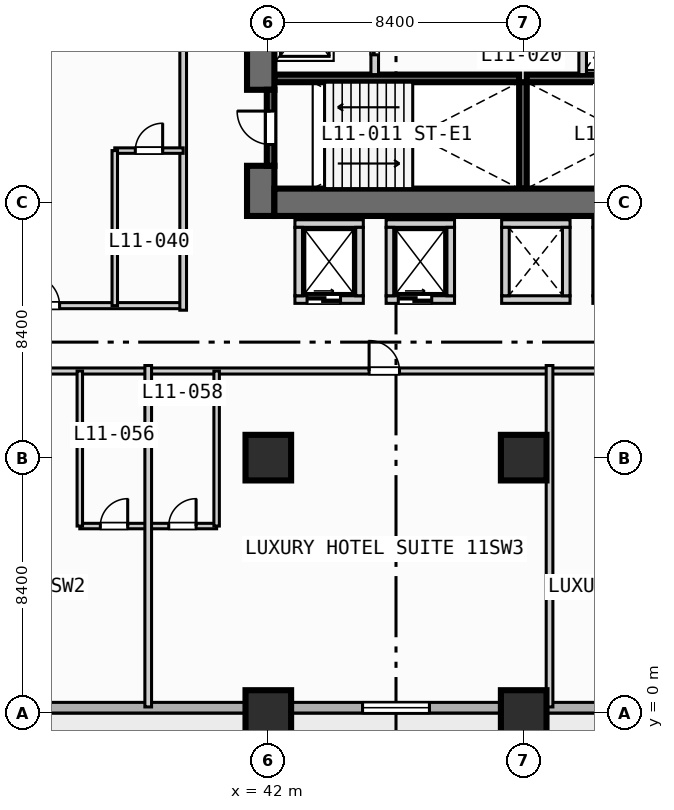
"""IFC4 building model, lengths in metres.
Left out: names, types, materials, properties, quantities, classifications, styles, units other than length and angle.
Written with IfcOpenShell. Run it as: python <this file> out.ifc"""

import sys

from ifc_helpers import new_model, si_unit, direction, frame, frame_2d, origin, origin_2d, place, context, subcontext, project, spatial, rectangle, extrude, element, fill, save


model = new_model("IFC4")
c1 = context("Model", 3, precision=1e-05, world=origin(), true_north=direction((0.0, 1.0)))
c2 = subcontext(c1, "Body", "Model", "MODEL_VIEW")
j1 = project(units=[si_unit("LENGTHUNIT", "METRE"), si_unit("PLANEANGLEUNIT", "RADIAN")], contexts=[c1])
p1 = place(None, origin())
s1 = spatial("IfcSite", under=j1, at=p1, CompositionType="ELEMENT")
p2 = place(p1, origin())
s2 = spatial("IfcBuilding", under=s1, at=p2, CompositionType="ELEMENT")
p3 = place(p2, frame((0.0, 0.0, 51.0)))
s3 = spatial("IfcBuildingStorey", under=s2, at=p3, CompositionType="ELEMENT", Elevation=51.0)
for number, where, z_axis, x_axis in (
    (1, (42.2, 20.875, 0.0), (0.0, 0.0, 1.0), (1.0, 0.0, 0.0)),
    (2, (50.5, 20.875, 0.0), (0.0, 0.0, 1.0), (1.0, 0.0, 0.0)),
):
    element("IfcWall", number, at=place(p3, frame(where, z_axis=z_axis, x_axis=x_axis)), inside=s3, PredefinedType="SOLIDWALL", context=c2, shape_type="SweptSolid", body=[
        extrude(rectangle(XDim=8.05, YDim=0.25, at=frame_2d((4.025, 0.0))), origin(), (0.0, 0.0, 1.0), 3.55),
    ])
p4 = place(p3, frame((50.375, 17.25, 0.0), z_axis=(0.0, 0.0, 1.0), x_axis=(0.0, 1.0, 0.0)))
e3 = element("IfcWall", 3, at=p4, inside=s3, PredefinedType="SOLIDWALL", context=c2, shape_type="SweptSolid", body=[
    extrude(rectangle(XDim=3.5, YDim=0.25, at=frame_2d((1.75, 0.0))), origin(), (0.0, 0.0, 1.0), 3.55),
])
p5 = place(p3, frame((41.75, 16.35, 0.0), z_axis=(0.0, 0.0, 1.0), x_axis=(0.0, 1.0, 0.0)))
e4 = element("IfcWall", 4, at=p5, inside=s3, PredefinedType="SHEAR", context=c2, shape_type="SweptSolid", body=[
    extrude(rectangle(XDim=1.65, YDim=0.9, at=frame_2d((0.825, 0.0))), origin(), (0.0, 0.0, 1.0), 3.55),
])
p6 = place(p3, frame((41.75, 20.5, 0.0), z_axis=(0.0, 0.0, 1.0), x_axis=(0.0, 1.0, 0.0)))
e5 = element("IfcWall", 5, at=p6, inside=s3, PredefinedType="SHEAR", context=c2, shape_type="SweptSolid", body=[
    extrude(rectangle(XDim=5.15, YDim=0.9, at=frame_2d((2.575, 0.0))), origin(), (0.0, 0.0, 1.0), 3.55),
])
p7 = place(p3, frame((42.2, 16.8, 0.0), z_axis=(0.0, 0.0, 1.0), x_axis=(1.0, 0.0, 0.0)))
e6 = element("IfcWall", 6, at=p7, inside=s3, PredefinedType="SHEAR", context=c2, shape_type="SweptSolid", body=[
    extrude(rectangle(XDim=16.35, YDim=0.9, at=frame_2d((8.175, 0.0))), origin(), (0.0, 0.0, 1.0), 3.55),
])
for number, where, z_axis, x_axis in (
    (7, (42.0, 0.0, 0.0), (0.0, 0.0, 1.0), (1.0, 0.0, 0.0)),
    (8, (42.0, 8.4, 0.0), (0.0, 0.0, 1.0), (1.0, 0.0, 0.0)),
    (9, (50.4, 0.0, 0.0), (0.0, 0.0, 1.0), (1.0, 0.0, 0.0)),
    (10, (50.4, 8.4, 0.0), (0.0, 0.0, 1.0), (1.0, 0.0, 0.0)),
):
    element("IfcColumn", number, at=place(p3, frame(where, z_axis=z_axis, x_axis=x_axis)), inside=s3, PredefinedType="COLUMN", context=c2, shape_type="SweptSolid", body=[
        extrude(rectangle(XDim=1.5, YDim=1.5, at=origin_2d()), origin(), (0.0, 0.0, 1.0), 3.8),
    ])
p8 = place(p3, frame((89.225, 0.175, 0.0), z_axis=(0.0, 0.0, 1.0), x_axis=(-1.0, 0.0, 0.0)))
e11 = element("IfcWall", 11, at=p8, inside=s3, PredefinedType="STANDARD", context=c2, shape_type="SweptSolid", body=[
    extrude(rectangle(XDim=86.05, YDim=0.35, at=frame_2d((43.025, 0.0))), origin(), (0.0, 0.0, 1.0), 3.55),
])
p9 = place(p8, frame((67.525, 0.0, 0.0)))
e12 = element("IfcOpeningElement", 12, at=p9, cuts=e11, PredefinedType="OPENING", context=c2, shape_type="SweptSolid", body=[
    extrude(rectangle(XDim=1.4, YDim=2.2, at=frame_2d((0.7, 1.1))), frame((0.0, 0.185, 0.0), z_axis=(0.0, -1.0, 0.0), x_axis=(1.0, 0.0, 0.0)), (0.0, 0.0, 1.0), 0.37),
])
p10 = place(p8, frame((58.725, 0.0, 0.85)))
e13 = element("IfcOpeningElement", 13, at=p10, cuts=e11, PredefinedType="OPENING", context=c2, shape_type="SweptSolid", body=[
    extrude(rectangle(XDim=2.2, YDim=1.8, at=frame_2d((1.1, 0.9))), frame((0.0, 0.185, 0.0), z_axis=(0.0, -1.0, 0.0), x_axis=(1.0, 0.0, 0.0)), (0.0, 0.0, 1.0), 0.37),
])
p11 = place(p8, frame((41.925, 0.0, 0.85)))
e14 = element("IfcOpeningElement", 14, at=p11, cuts=e11, PredefinedType="OPENING", context=c2, shape_type="SweptSolid", body=[
    extrude(rectangle(XDim=2.2, YDim=1.8, at=frame_2d((1.1, 0.9))), frame((0.0, 0.185, 0.0), z_axis=(0.0, -1.0, 0.0), x_axis=(1.0, 0.0, 0.0)), (0.0, 0.0, 1.0), 0.37),
])
p12 = place(p8, frame((33.525, 0.0, 0.85)))
e15 = element("IfcOpeningElement", 15, at=p12, cuts=e11, PredefinedType="OPENING", context=c2, shape_type="SweptSolid", body=[
    extrude(rectangle(XDim=2.2, YDim=1.8, at=frame_2d((1.1, 0.9))), frame((0.0, 0.185, 0.0), z_axis=(0.0, -1.0, 0.0), x_axis=(1.0, 0.0, 0.0)), (0.0, 0.0, 1.0), 0.37),
])
p13 = place(p8, frame((16.725, 0.0, 0.85)))
e16 = element("IfcOpeningElement", 16, at=p13, cuts=e11, PredefinedType="OPENING", context=c2, shape_type="SweptSolid", body=[
    extrude(rectangle(XDim=2.2, YDim=1.8, at=frame_2d((1.1, 0.9))), frame((0.0, 0.185, 0.0), z_axis=(0.0, -1.0, 0.0), x_axis=(1.0, 0.0, 0.0)), (0.0, 0.0, 1.0), 0.37),
])
p14 = place(p8, frame((8.325, 0.0, 0.85)))
e17 = element("IfcOpeningElement", 17, at=p14, cuts=e11, PredefinedType="OPENING", context=c2, shape_type="SweptSolid", body=[
    extrude(rectangle(XDim=2.2, YDim=1.8, at=frame_2d((1.1, 0.9))), frame((0.0, 0.185, 0.0), z_axis=(0.0, -1.0, 0.0), x_axis=(1.0, 0.0, 0.0)), (0.0, 0.0, 1.0), 0.37),
])
p15 = place(p3, frame((42.075, 18.0, 0.0), z_axis=(0.0, 0.0, 1.0), x_axis=(0.0, 1.0, 0.0)))
e18 = element("IfcWall", 18, at=p15, inside=s3, PredefinedType="SOLIDWALL", context=c2, shape_type="SweptSolid", body=[
    extrude(rectangle(XDim=2.5, YDim=0.25, at=frame_2d((1.25, 0.0))), origin(), (0.0, 0.0, 1.0), 3.55),
])
p16 = place(p15, frame((0.7, 0.0, 0.0)))
e19 = element("IfcOpeningElement", 19, at=p16, cuts=e18, PredefinedType="OPENING", context=c2, shape_type="SweptSolid", body=[
    extrude(rectangle(XDim=1.1, YDim=2.15, at=frame_2d((0.55, 1.075))), frame((0.0, 0.135, 0.0), z_axis=(0.0, -1.0, 0.0), x_axis=(1.0, 0.0, 0.0)), (0.0, 0.0, 1.0), 0.27),
])
p17 = place(p3, frame((45.5, 21.0, 0.0), z_axis=(0.0, 0.0, 1.0), x_axis=(0.0, 1.0, 0.0)))
e20 = element("IfcWall", 20, at=p17, inside=s3, PredefinedType="SOLIDWALL", context=c2, shape_type="SweptSolid", body=[
    extrude(rectangle(XDim=4.15, YDim=0.25, at=frame_2d((2.075, 0.0))), origin(), (0.0, 0.0, 1.0), 3.55),
])
p18 = place(p17, frame((0.65, 0.0, 0.0)))
e21 = element("IfcOpeningElement", 21, at=p18, cuts=e20, PredefinedType="OPENING", context=c2, shape_type="SweptSolid", body=[
    extrude(rectangle(XDim=1.1, YDim=2.15, at=frame_2d((0.55, 1.075))), frame((0.0, 0.135, 0.0), z_axis=(0.0, -1.0, 0.0), x_axis=(1.0, 0.0, 0.0)), (0.0, 0.0, 1.0), 0.27),
])
p19 = place(p3, frame((52.34, 21.0, 0.0), z_axis=(0.0, 0.0, 1.0), x_axis=(0.0, 1.0, 0.0)))
e22 = element("IfcWall", 22, at=p19, inside=s3, PredefinedType="SOLIDWALL", context=c2, shape_type="SweptSolid", body=[
    extrude(rectangle(XDim=3.75, YDim=0.25, at=frame_2d((1.875, 0.0))), origin(), (0.0, 0.0, 1.0), 3.55),
])
p20 = place(p3, frame((42.875, 13.6, 0.0), z_axis=(0.0, 0.0, 1.0), x_axis=(1.0, 0.0, 0.0)))
e23 = element("IfcWall", 23, at=p20, inside=s3, PredefinedType="SOLIDWALL", context=c2, shape_type="SweptSolid", body=[
    extrude(rectangle(XDim=2.25, YDim=0.25, at=frame_2d((1.125, 0.0))), origin(), (0.0, 0.0, 1.0), 3.55),
])
p21 = place(p20, frame((0.4, 0.0, 0.0)))
e24 = element("IfcOpeningElement", 24, at=p21, cuts=e23, PredefinedType="OPENING", context=c2, shape_type="SweptSolid", body=[
    extrude(rectangle(XDim=1.1, YDim=2.15, at=frame_2d((0.55, 1.075))), frame((0.0, 0.135, 0.0), z_axis=(0.0, -1.0, 0.0), x_axis=(1.0, 0.0, 0.0)), (0.0, 0.0, 1.0), 0.27),
])
for number, where, z_axis, x_axis in (
    (25, (42.875, 16.1, 0.0), (0.0, 0.0, 1.0), (1.0, 0.0, 0.0)),
    (26, (43.0, 13.725, 0.0), (0.0, 0.0, 1.0), (0.0, 1.0, 0.0)),
    (27, (45.0, 13.725, 0.0), (0.0, 0.0, 1.0), (0.0, 1.0, 0.0)),
):
    element("IfcWall", number, at=place(p3, frame(where, z_axis=z_axis, x_axis=x_axis)), inside=s3, PredefinedType="SOLIDWALL", context=c2, shape_type="SweptSolid", body=[
        extrude(rectangle(XDim=2.25, YDim=0.25, at=frame_2d((1.125, 0.0))), origin(), (0.0, 0.0, 1.0), 3.55),
    ])
p22 = place(p3, frame((45.875, 13.6, 0.0), z_axis=(0.0, 0.0, 1.0), x_axis=(1.0, 0.0, 0.0)))
e28 = element("IfcWall", 28, at=p22, inside=s3, PredefinedType="SOLIDWALL", context=c2, shape_type="SweptSolid", body=[
    extrude(rectangle(XDim=2.25, YDim=0.25, at=frame_2d((1.125, 0.0))), origin(), (0.0, 0.0, 1.0), 3.55),
])
p23 = place(p22, frame((0.4, 0.0, 0.0)))
e29 = element("IfcOpeningElement", 29, at=p23, cuts=e28, PredefinedType="OPENING", context=c2, shape_type="SweptSolid", body=[
    extrude(rectangle(XDim=1.1, YDim=2.15, at=frame_2d((0.55, 1.075))), frame((0.0, 0.135, 0.0), z_axis=(0.0, -1.0, 0.0), x_axis=(1.0, 0.0, 0.0)), (0.0, 0.0, 1.0), 0.27),
])
for number, where, z_axis, x_axis in (
    (30, (45.875, 16.1, 0.0), (0.0, 0.0, 1.0), (1.0, 0.0, 0.0)),
    (31, (46.0, 13.725, 0.0), (0.0, 0.0, 1.0), (0.0, 1.0, 0.0)),
    (32, (48.0, 13.725, 0.0), (0.0, 0.0, 1.0), (0.0, 1.0, 0.0)),
    (33, (49.675, 13.6, 0.0), (0.0, 0.0, 1.0), (1.0, 0.0, 0.0)),
    (34, (49.675, 16.1, 0.0), (0.0, 0.0, 1.0), (1.0, 0.0, 0.0)),
    (35, (49.8, 13.725, 0.0), (0.0, 0.0, 1.0), (0.0, 1.0, 0.0)),
    (36, (51.8, 13.725, 0.0), (0.0, 0.0, 1.0), (0.0, 1.0, 0.0)),
    (37, (52.675, 13.6, 0.0), (0.0, 0.0, 1.0), (1.0, 0.0, 0.0)),
    (38, (52.675, 16.1, 0.0), (0.0, 0.0, 1.0), (1.0, 0.0, 0.0)),
    (39, (52.8, 13.725, 0.0), (0.0, 0.0, 1.0), (0.0, 1.0, 0.0)),
):
    element("IfcWall", number, at=place(p3, frame(where, z_axis=z_axis, x_axis=x_axis)), inside=s3, PredefinedType="SOLIDWALL", context=c2, shape_type="SweptSolid", body=[
        extrude(rectangle(XDim=2.25, YDim=0.25, at=frame_2d((1.125, 0.0))), origin(), (0.0, 0.0, 1.0), 3.55),
    ])
p24 = place(p3, frame((25.6, 13.4, 0.0), z_axis=(0.0, 0.0, 1.0), x_axis=(1.0, 0.0, 0.0)))
e40 = element("IfcWall", 40, at=p24, inside=s3, PredefinedType="PARTITIONING", context=c2, shape_type="SweptSolid", body=[
    extrude(rectangle(XDim=13.6, YDim=0.2, at=frame_2d((6.8, 0.0))), origin(), (0.0, 0.0, 1.0), 3.55),
])
p25 = place(p24, frame((1.735, 0.0, 0.0)))
e41 = element("IfcOpeningElement", 41, at=p25, cuts=e40, PredefinedType="OPENING", context=c2, shape_type="SweptSolid", body=[
    extrude(rectangle(XDim=1.0, YDim=2.15, at=frame_2d((0.5, 1.075))), frame((0.0, 0.11, 0.0), z_axis=(0.0, -1.0, 0.0), x_axis=(1.0, 0.0, 0.0)), (0.0, 0.0, 1.0), 0.22),
])
p26 = place(p24, frame((8.535, 0.0, 0.0)))
e42 = element("IfcOpeningElement", 42, at=p26, cuts=e40, PredefinedType="OPENING", context=c2, shape_type="SweptSolid", body=[
    extrude(rectangle(XDim=1.0, YDim=2.15, at=frame_2d((0.5, 1.075))), frame((0.0, 0.11, 0.0), z_axis=(0.0, -1.0, 0.0), x_axis=(1.0, 0.0, 0.0)), (0.0, 0.0, 1.0), 0.22),
])
p27 = place(p3, frame((39.2, 13.25, 0.0), z_axis=(0.0, 0.0, 1.0), x_axis=(0.0, 1.0, 0.0)))
e43 = element("IfcWall", 43, at=p27, inside=s3, PredefinedType="PARTITIONING", context=c2, shape_type="SweptSolid", body=[
    extrude(rectangle(XDim=20.18, YDim=0.22, at=frame_2d((10.09, 0.0))), origin(), (0.0, 0.0, 1.0), 3.55),
])
p28 = place(p3, frame((36.95, 18.5, 0.0), z_axis=(0.0, 0.0, 1.0), x_axis=(1.0, 0.0, 0.0)))
e44 = element("IfcWall", 44, at=p28, inside=s3, PredefinedType="PLUMBINGWALL", context=c2, shape_type="SweptSolid", body=[
    extrude(rectangle(XDim=2.25, YDim=0.18, at=frame_2d((1.125, 0.0))), origin(), (0.0, 0.0, 1.0), 3.55),
])
p29 = place(p28, frame((0.675, 0.0, 0.0)))
e45 = element("IfcOpeningElement", 45, at=p29, cuts=e44, PredefinedType="OPENING", context=c2, shape_type="SweptSolid", body=[
    extrude(rectangle(XDim=0.9, YDim=2.1, at=frame_2d((0.45, 1.05))), frame((0.0, 0.1, 0.0), z_axis=(0.0, -1.0, 0.0), x_axis=(1.0, 0.0, 0.0)), (0.0, 0.0, 1.0), 0.2),
])
p30 = place(p3, frame((36.95, 13.4, 0.0), z_axis=(0.0, 0.0, 1.0), x_axis=(0.0, 1.0, 0.0)))
e46 = element("IfcWall", 46, at=p30, inside=s3, PredefinedType="PLUMBINGWALL", context=c2, shape_type="SweptSolid", body=[
    extrude(rectangle(XDim=5.1, YDim=0.18, at=frame_2d((2.55, 0.0))), origin(), (0.0, 0.0, 1.0), 3.55),
])
p31 = place(p3, frame((13.65, 11.25, 0.0), z_axis=(0.0, 0.0, 1.0), x_axis=(1.0, 0.0, 0.0)))
e47 = element("IfcWall", 47, at=p31, inside=s3, PredefinedType="PARTITIONING", context=c2, shape_type="SweptSolid", body=[
    extrude(rectangle(XDim=75.15, YDim=0.2, at=frame_2d((37.575, 0.0))), origin(), (0.0, 0.0, 1.0), 3.55),
])
p32 = place(p31, frame((7.265, 0.0, 0.0)))
e48 = element("IfcOpeningElement", 48, at=p32, cuts=e47, PredefinedType="OPENING", context=c2, shape_type="SweptSolid", body=[
    extrude(rectangle(XDim=1.0, YDim=2.15, at=frame_2d((0.5, 1.075))), frame((0.0, 0.11, 0.0), z_axis=(0.0, -1.0, 0.0), x_axis=(1.0, 0.0, 0.0)), (0.0, 0.0, 1.0), 0.22),
])
p33 = place(p31, frame((17.135, 0.0, 0.0)))
e49 = element("IfcOpeningElement", 49, at=p33, cuts=e47, PredefinedType="OPENING", context=c2, shape_type="SweptSolid", body=[
    extrude(rectangle(XDim=1.0, YDim=2.15, at=frame_2d((0.5, 1.075))), frame((0.0, 0.11, 0.0), z_axis=(0.0, -1.0, 0.0), x_axis=(1.0, 0.0, 0.0)), (0.0, 0.0, 1.0), 0.22),
])
p34 = place(p31, frame((31.665, 0.0, 0.0)))
e50 = element("IfcOpeningElement", 50, at=p34, cuts=e47, PredefinedType="OPENING", context=c2, shape_type="SweptSolid", body=[
    extrude(rectangle(XDim=1.0, YDim=2.15, at=frame_2d((0.5, 1.075))), frame((0.0, 0.11, 0.0), z_axis=(0.0, -1.0, 0.0), x_axis=(1.0, 0.0, 0.0)), (0.0, 0.0, 1.0), 0.22),
])
p35 = place(p31, frame((41.535, 0.0, 0.0)))
e51 = element("IfcOpeningElement", 51, at=p35, cuts=e47, PredefinedType="OPENING", context=c2, shape_type="SweptSolid", body=[
    extrude(rectangle(XDim=1.0, YDim=2.15, at=frame_2d((0.5, 1.075))), frame((0.0, 0.11, 0.0), z_axis=(0.0, -1.0, 0.0), x_axis=(1.0, 0.0, 0.0)), (0.0, 0.0, 1.0), 0.22),
])
p36 = place(p31, frame((56.065, 0.0, 0.0)))
e52 = element("IfcOpeningElement", 52, at=p36, cuts=e47, PredefinedType="OPENING", context=c2, shape_type="SweptSolid", body=[
    extrude(rectangle(XDim=1.0, YDim=2.15, at=frame_2d((0.5, 1.075))), frame((0.0, 0.11, 0.0), z_axis=(0.0, -1.0, 0.0), x_axis=(1.0, 0.0, 0.0)), (0.0, 0.0, 1.0), 0.22),
])
p37 = place(p31, frame((66.91, 0.0, 0.0)))
e53 = element("IfcOpeningElement", 53, at=p37, cuts=e47, PredefinedType="OPENING", context=c2, shape_type="SweptSolid", body=[
    extrude(rectangle(XDim=1.0, YDim=2.15, at=frame_2d((0.5, 1.075))), frame((0.0, 0.11, 0.0), z_axis=(0.0, -1.0, 0.0), x_axis=(1.0, 0.0, 0.0)), (0.0, 0.0, 1.0), 0.22),
])
p38 = place(p3, frame((35.8, 6.15, 0.0), z_axis=(0.0, 0.0, 1.0), x_axis=(1.0, 0.0, 0.0)))
e54 = element("IfcWall", 54, at=p38, inside=s3, PredefinedType="PLUMBINGWALL", context=c2, shape_type="SweptSolid", body=[
    extrude(rectangle(XDim=4.5, YDim=0.18, at=frame_2d((2.25, 0.0))), origin(), (0.0, 0.0, 1.0), 3.55),
])
p39 = place(p38, frame((0.675, 0.0, 0.0)))
e55 = element("IfcOpeningElement", 55, at=p39, cuts=e54, PredefinedType="OPENING", context=c2, shape_type="SweptSolid", body=[
    extrude(rectangle(XDim=0.9, YDim=2.1, at=frame_2d((0.45, 1.05))), frame((0.0, 0.1, 0.0), z_axis=(0.0, -1.0, 0.0), x_axis=(1.0, 0.0, 0.0)), (0.0, 0.0, 1.0), 0.2),
])
p40 = place(p38, frame((2.925, 0.0, 0.0)))
e56 = element("IfcOpeningElement", 56, at=p40, cuts=e54, PredefinedType="OPENING", context=c2, shape_type="SweptSolid", body=[
    extrude(rectangle(XDim=0.9, YDim=2.1, at=frame_2d((0.45, 1.05))), frame((0.0, 0.1, 0.0), z_axis=(0.0, -1.0, 0.0), x_axis=(1.0, 0.0, 0.0)), (0.0, 0.0, 1.0), 0.2),
])
p41 = place(p3, frame((35.8, 6.15, 0.0), z_axis=(0.0, 0.0, 1.0), x_axis=(0.0, 1.0, 0.0)))
e57 = element("IfcWall", 57, at=p41, inside=s3, PredefinedType="PLUMBINGWALL", context=c2, shape_type="SweptSolid", body=[
    extrude(rectangle(XDim=5.1, YDim=0.18, at=frame_2d((2.55, 0.0))), origin(), (0.0, 0.0, 1.0), 3.55),
])
p42 = place(p3, frame((38.05, 0.2, 0.0), z_axis=(0.0, 0.0, 1.0), x_axis=(0.0, 1.0, 0.0)))
e58 = element("IfcWall", 58, at=p42, inside=s3, PredefinedType="PARTITIONING", context=c2, shape_type="SweptSolid", body=[
    extrude(rectangle(XDim=11.23, YDim=0.22, at=frame_2d((5.615, 0.0))), origin(), (0.0, 0.0, 1.0), 3.55),
])
p43 = place(p3, frame((40.3, 6.15, 0.0), z_axis=(0.0, 0.0, 1.0), x_axis=(0.0, 1.0, 0.0)))
e59 = element("IfcWall", 59, at=p43, inside=s3, PredefinedType="PLUMBINGWALL", context=c2, shape_type="SweptSolid", body=[
    extrude(rectangle(XDim=5.1, YDim=0.18, at=frame_2d((2.55, 0.0))), origin(), (0.0, 0.0, 1.0), 3.55),
])
p44 = place(p3, frame((51.25, 0.2, 0.0), z_axis=(0.0, 0.0, 1.0), x_axis=(0.0, 1.0, 0.0)))
e60 = element("IfcWall", 60, at=p44, inside=s3, PredefinedType="PARTITIONING", context=c2, shape_type="SweptSolid", body=[
    extrude(rectangle(XDim=11.23, YDim=0.22, at=frame_2d((5.615, 0.0))), origin(), (0.0, 0.0, 1.0), 3.55),
])
p45 = place(p11, origin())
e61 = element("IfcWindow", 61, at=p45, inside=s3, PartitioningType="SINGLE_PANEL", PredefinedType="WINDOW", context=c2, shape_type="SweptSolid", body=[
    extrude(rectangle(XDim=2.2, YDim=1.8, at=frame_2d((1.1, 0.9))), frame((0.0, 0.03, 0.0), z_axis=(0.0, -1.0, 0.0), x_axis=(1.0, 0.0, 0.0)), (0.0, 0.0, 1.0), 0.06),
])
fill(e14, e61)
p46 = place(p16, origin())
e62 = element("IfcDoor", 62, at=p46, inside=s3, OperationType="SINGLE_SWING_RIGHT", PredefinedType="DOOR", context=c2, shape_type="SweptSolid", body=[
    extrude(rectangle(XDim=1.1, YDim=2.15, at=frame_2d((0.55, 1.075))), frame((0.0, 0.025, 0.0), z_axis=(0.0, -1.0, 0.0), x_axis=(1.0, 0.0, 0.0)), (0.0, 0.0, 1.0), 0.05),
])
fill(e19, e62)
p47 = place(p18, origin())
e63 = element("IfcDoor", 63, at=p47, inside=s3, OperationType="SLIDING_TO_LEFT", PredefinedType="DOOR", context=c2, shape_type="SweptSolid", body=[
    extrude(rectangle(XDim=1.1, YDim=2.15, at=frame_2d((0.55, 1.075))), frame((0.0, 0.025, 0.0), z_axis=(0.0, -1.0, 0.0), x_axis=(1.0, 0.0, 0.0)), (0.0, 0.0, 1.0), 0.05),
])
fill(e21, e63)
p48 = place(p21, origin())
e64 = element("IfcDoor", 64, at=p48, inside=s3, OperationType="SLIDING_TO_LEFT", PredefinedType="DOOR", context=c2, shape_type="SweptSolid", body=[
    extrude(rectangle(XDim=1.1, YDim=2.15, at=frame_2d((0.55, 1.075))), frame((0.0, 0.025, 0.0), z_axis=(0.0, -1.0, 0.0), x_axis=(1.0, 0.0, 0.0)), (0.0, 0.0, 1.0), 0.05),
])
fill(e24, e64)
p49 = place(p23, origin())
e65 = element("IfcDoor", 65, at=p49, inside=s3, OperationType="SLIDING_TO_LEFT", PredefinedType="DOOR", context=c2, shape_type="SweptSolid", body=[
    extrude(rectangle(XDim=1.1, YDim=2.15, at=frame_2d((0.55, 1.075))), frame((0.0, 0.025, 0.0), z_axis=(0.0, -1.0, 0.0), x_axis=(1.0, 0.0, 0.0)), (0.0, 0.0, 1.0), 0.05),
])
fill(e29, e65)
p50 = place(p26, origin())
e66 = element("IfcDoor", 66, at=p50, inside=s3, OperationType="SINGLE_SWING_LEFT", PredefinedType="DOOR", context=c2, shape_type="SweptSolid", body=[
    extrude(rectangle(XDim=1.0, YDim=2.15, at=frame_2d((0.5, 1.075))), frame((0.0, 0.025, 0.0), z_axis=(0.0, -1.0, 0.0), x_axis=(1.0, 0.0, 0.0)), (0.0, 0.0, 1.0), 0.05),
])
fill(e42, e66)
p51 = place(p29, origin())
e67 = element("IfcDoor", 67, at=p51, inside=s3, OperationType="SINGLE_SWING_RIGHT", PredefinedType="DOOR", context=c2, shape_type="SweptSolid", body=[
    extrude(rectangle(XDim=0.9, YDim=2.1, at=frame_2d((0.45, 1.05))), frame((0.0, 0.025, 0.0), z_axis=(0.0, -1.0, 0.0), x_axis=(1.0, 0.0, 0.0)), (0.0, 0.0, 1.0), 0.05),
])
fill(e45, e67)
p52 = place(p34, origin())
e68 = element("IfcDoor", 68, at=p52, inside=s3, OperationType="SINGLE_SWING_LEFT", PredefinedType="DOOR", context=c2, shape_type="SweptSolid", body=[
    extrude(rectangle(XDim=1.0, YDim=2.15, at=frame_2d((0.5, 1.075))), frame((0.0, 0.025, 0.0), z_axis=(0.0, -1.0, 0.0), x_axis=(1.0, 0.0, 0.0)), (0.0, 0.0, 1.0), 0.05),
])
fill(e50, e68)
p53 = place(p39, origin())
e69 = element("IfcDoor", 69, at=p53, inside=s3, OperationType="SINGLE_SWING_RIGHT", PredefinedType="DOOR", context=c2, shape_type="SweptSolid", body=[
    extrude(rectangle(XDim=0.9, YDim=2.1, at=frame_2d((0.45, 1.05))), frame((0.0, 0.025, 0.0), z_axis=(0.0, -1.0, 0.0), x_axis=(1.0, 0.0, 0.0)), (0.0, 0.0, 1.0), 0.05),
])
fill(e55, e69)
p54 = place(p40, origin())
e70 = element("IfcDoor", 70, at=p54, inside=s3, OperationType="SINGLE_SWING_RIGHT", PredefinedType="DOOR", context=c2, shape_type="SweptSolid", body=[
    extrude(rectangle(XDim=0.9, YDim=2.1, at=frame_2d((0.45, 1.05))), frame((0.0, 0.025, 0.0), z_axis=(0.0, -1.0, 0.0), x_axis=(1.0, 0.0, 0.0)), (0.0, 0.0, 1.0), 0.05),
])
fill(e56, e70)
save(model, sys.argv[1])
